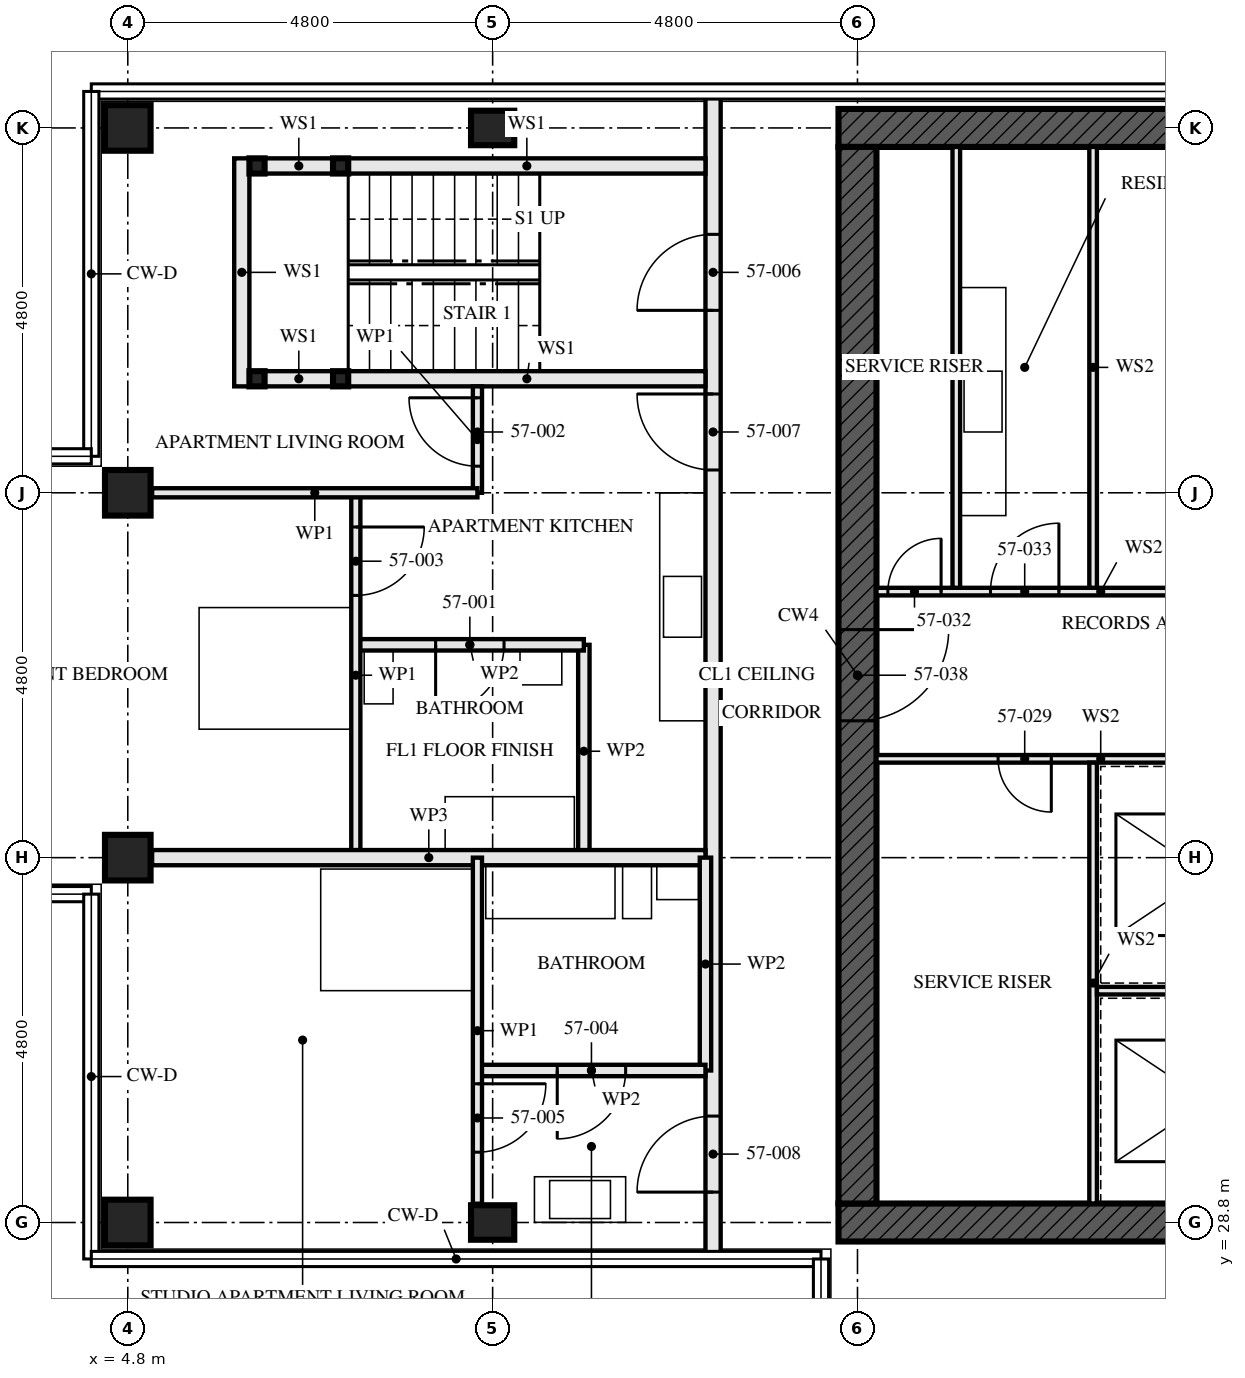
"""IFC4 building model, lengths in metres.
Left out: names, types, materials, properties, quantities, classifications, styles, units other than length and angle.
Written with IfcOpenShell. Run it as: python <this file> out.ifc"""

import sys

from ifc_helpers import new_model, si_unit, direction, frame, frame_2d, origin, origin_2d, place, context, subcontext, project, spatial, rectangle, hollow_rectangle, i_section, extrude, element, fill, save


model = new_model("IFC4")
c1 = context("Model", 3, precision=1e-05, world=origin(), true_north=direction((0.0, 1.0)))
c2 = subcontext(c1, "Body", "Model", "MODEL_VIEW")
j1 = project(units=[si_unit("LENGTHUNIT", "METRE"), si_unit("PLANEANGLEUNIT", "RADIAN")], contexts=[c1])
p1 = place(None, origin())
s1 = spatial("IfcSite", under=j1, at=p1, CompositionType="ELEMENT")
p2 = place(p1, origin())
s2 = spatial("IfcBuilding", under=s1, at=p2, CompositionType="ELEMENT")
p3 = place(p2, frame((0.0, 0.0, 208.5)))
s3 = spatial("IfcBuildingStorey", under=s2, at=p3, CompositionType="ELEMENT", Elevation=208.5)
for number, where, z_axis, x_axis in (
    (1, (4.8, 28.8, 0.0), (0.0, 0.0, 1.0), (0.0, 1.0, 0.0)),
    (2, (4.8, 33.6, 0.0), (0.0, 0.0, 1.0), (0.0, 1.0, 0.0)),
    (3, (4.8, 38.4, 0.0), (0.0, 0.0, 1.0), (0.0, 1.0, 0.0)),
    (4, (4.8, 43.2, 0.0), (0.0, 0.0, 1.0), (0.0, 1.0, 0.0)),
):
    element("IfcColumn", number, at=place(p3, frame(where, z_axis=z_axis, x_axis=x_axis)), inside=s3, PredefinedType="COLUMN", context=c2, shape_type="SweptSolid", body=[
        extrude(hollow_rectangle(XDim=0.6, YDim=0.6, WallThickness=0.05, at=origin_2d()), origin(), (0.0, 0.0, 1.0), 3.5),
    ])
for number, where, z_axis, x_axis in (
    (5, (9.6, 28.8, 0.0), (0.0, 0.0, 1.0), (0.0, 1.0, 0.0)),
    (6, (9.6, 43.2, 0.0), (0.0, 0.0, 1.0), (0.0, 1.0, 0.0)),
):
    element("IfcColumn", number, at=place(p3, frame(where, z_axis=z_axis, x_axis=x_axis)), inside=s3, PredefinedType="COLUMN", context=c2, shape_type="SweptSolid", body=[
        extrude(i_section(OverallWidth=0.454, OverallDepth=0.569, WebThickness=0.078, FlangeThickness=0.125, FilletRadius=0.015, at=origin_2d()), origin(), (0.0, 0.0, 1.0), 3.5),
    ])
p4 = place(p3, frame((14.15, 28.8, -0.17), z_axis=(0.0, 0.0, 1.0), x_axis=(1.0, 0.0, 0.0)))
e7 = element("IfcWall", 7, at=p4, inside=s3, PredefinedType="SHEAR", context=c2, shape_type="SweptSolid", body=[
    extrude(rectangle(XDim=14.9, YDim=0.5, at=frame_2d((7.45, 0.0))), origin(), (0.0, 0.0, 1.0), 3.5),
])
p5 = place(p4, frame((6.85, 0.0, 0.17)))
e8 = element("IfcOpeningElement", 8, at=p5, cuts=e7, PredefinedType="OPENING", context=c2, shape_type="SweptSolid", body=[
    extrude(rectangle(XDim=1.2, YDim=2.1, at=frame_2d((0.6, 1.05))), frame((0.0, 0.26, 0.0), z_axis=(0.0, -1.0, 0.0), x_axis=(1.0, 0.0, 0.0)), (0.0, 0.0, 1.0), 0.521),
])
p6 = place(p3, frame((29.05, 43.2, -0.17), z_axis=(0.0, 0.0, 1.0), x_axis=(-1.0, 0.0, 0.0)))
e9 = element("IfcWall", 9, at=p6, inside=s3, PredefinedType="SHEAR", context=c2, shape_type="SweptSolid", body=[
    extrude(rectangle(XDim=14.9, YDim=0.5, at=frame_2d((7.45, 0.0))), origin(), (0.0, 0.0, 1.0), 3.5),
])
p7 = place(p3, frame((14.4, 42.95, -0.17), z_axis=(0.0, 0.0, 1.0), x_axis=(0.0, -1.0, 0.0)))
e10 = element("IfcWall", 10, at=p7, inside=s3, PredefinedType="SHEAR", context=c2, shape_type="SweptSolid", body=[
    extrude(rectangle(XDim=13.9, YDim=0.5, at=frame_2d((6.95, 0.0))), origin(), (0.0, 0.0, 1.0), 3.5),
])
p8 = place(p7, frame((6.35, 0.0, 0.17)))
e11 = element("IfcOpeningElement", 11, at=p8, cuts=e10, PredefinedType="OPENING", context=c2, shape_type="SweptSolid", body=[
    extrude(rectangle(XDim=1.2, YDim=2.1, at=frame_2d((0.6, 1.05))), frame((0.0, 0.26, 0.0), z_axis=(0.0, -1.0, 0.0), x_axis=(1.0, 0.0, 0.0)), (0.0, 0.0, 1.0), 0.521),
])
for number, where, z_axis, x_axis in (
    (12, (6.5, 42.7, 0.0), (0.0, 0.0, 1.0), (1.0, 0.0, 0.0)),
    (13, (6.5, 39.9, 0.0), (0.0, 0.0, 1.0), (1.0, 0.0, 0.0)),
    (14, (7.6, 42.7, 0.0), (0.0, 0.0, 1.0), (1.0, 0.0, 0.0)),
    (15, (7.6, 39.9, 0.0), (0.0, 0.0, 1.0), (1.0, 0.0, 0.0)),
):
    element("IfcColumn", number, at=place(p3, frame(where, z_axis=z_axis, x_axis=x_axis)), inside=s3, PredefinedType="COLUMN", context=c2, shape_type="SweptSolid", body=[
        extrude(hollow_rectangle(XDim=0.2, YDim=0.2, WallThickness=0.008, at=origin_2d()), origin(), (0.0, 0.0, 1.0), 3.33),
    ])
p9 = place(p3, frame((6.6, 42.7, 0.0), z_axis=(0.0, 0.0, 1.0), x_axis=(1.0, 0.0, 0.0)))
e16 = element("IfcWall", 16, at=p9, inside=s3, PredefinedType="SOLIDWALL", context=c2, shape_type="SweptSolid", body=[
    extrude(rectangle(XDim=0.9, YDim=0.2, at=frame_2d((0.45, 0.0))), origin(), (0.0, 0.0, 1.0), 2.99),
])
p10 = place(p3, frame((7.7, 42.7, 0.0), z_axis=(0.0, 0.0, 1.0), x_axis=(1.0, 0.0, 0.0)))
e17 = element("IfcWall", 17, at=p10, inside=s3, PredefinedType="SOLIDWALL", context=c2, shape_type="SweptSolid", body=[
    extrude(rectangle(XDim=4.7, YDim=0.2, at=frame_2d((2.35, 0.0))), origin(), (0.0, 0.0, 1.0), 2.99),
])
p11 = place(p3, frame((6.6, 39.9, 0.0), z_axis=(0.0, 0.0, 1.0), x_axis=(1.0, 0.0, 0.0)))
e18 = element("IfcWall", 18, at=p11, inside=s3, PredefinedType="SOLIDWALL", context=c2, shape_type="SweptSolid", body=[
    extrude(rectangle(XDim=0.9, YDim=0.2, at=frame_2d((0.45, 0.0))), origin(), (0.0, 0.0, 1.0), 2.99),
])
p12 = place(p3, frame((7.7, 39.9, 0.0), z_axis=(0.0, 0.0, 1.0), x_axis=(1.0, 0.0, 0.0)))
e19 = element("IfcWall", 19, at=p12, inside=s3, PredefinedType="SOLIDWALL", context=c2, shape_type="SweptSolid", body=[
    extrude(rectangle(XDim=4.7, YDim=0.2, at=frame_2d((2.35, 0.0))), origin(), (0.0, 0.0, 1.0), 2.99),
])
p13 = place(p3, frame((6.3, 42.8, 0.0), z_axis=(0.0, 0.0, 1.0), x_axis=(0.0, -1.0, 0.0)))
e20 = element("IfcWall", 20, at=p13, inside=s3, PredefinedType="SOLIDWALL", context=c2, shape_type="SweptSolid", body=[
    extrude(rectangle(XDim=3.0, YDim=0.2, at=frame_2d((1.5, 0.0))), origin(), (0.0, 0.0, 1.0), 3.33),
])
p14 = place(p3, frame((7.8, 36.4, 0.0), z_axis=(0.0, 0.0, 1.0), x_axis=(1.0, 0.0, 0.0)))
e21 = element("IfcWall", 21, at=p14, inside=s3, PredefinedType="PARTITIONING", context=c2, shape_type="SweptSolid", body=[
    extrude(rectangle(XDim=3.0, YDim=0.15, at=frame_2d((1.5, 0.0))), origin(), (0.0, 0.0, 1.0), 3.33),
])
p15 = place(p14, frame((1.05, 0.0, 0.0)))
e22 = element("IfcOpeningElement", 22, at=p15, cuts=e21, PredefinedType="OPENING", context=c2, shape_type="SweptSolid", body=[
    extrude(rectangle(XDim=0.9, YDim=2.1, at=frame_2d((0.45, 1.05))), frame((0.0, 0.085, 0.0), z_axis=(0.0, -1.0, 0.0), x_axis=(1.0, 0.0, 0.0)), (0.0, 0.0, 1.0), 0.171),
])
p16 = place(p3, frame((10.8, 36.4, 0.0), z_axis=(0.0, 0.0, 1.0), x_axis=(0.0, -1.0, 0.0)))
e23 = element("IfcWall", 23, at=p16, inside=s3, PredefinedType="PARTITIONING", context=c2, shape_type="SweptSolid", body=[
    extrude(rectangle(XDim=2.8, YDim=0.15, at=frame_2d((1.4, 0.0))), origin(), (0.0, 0.0, 1.0), 3.33),
])
p17 = place(p3, frame((9.4, 39.8, 0.0), z_axis=(0.0, 0.0, 1.0), x_axis=(0.0, -1.0, 0.0)))
e24 = element("IfcWall", 24, at=p17, inside=s3, PredefinedType="PARTITIONING", context=c2, shape_type="SweptSolid", body=[
    extrude(rectangle(XDim=1.4, YDim=0.12, at=frame_2d((0.7, 0.0))), origin(), (0.0, 0.0, 1.0), 3.33),
])
p18 = place(p17, frame((0.15, 0.0, 0.0)))
e25 = element("IfcOpeningElement", 25, at=p18, cuts=e24, PredefinedType="OPENING", context=c2, shape_type="SweptSolid", body=[
    extrude(rectangle(XDim=0.9, YDim=2.1, at=frame_2d((0.45, 1.05))), frame((0.0, 0.071, 0.0), z_axis=(0.0, -1.0, 0.0), x_axis=(1.0, 0.0, 0.0)), (0.0, 0.0, 1.0), 0.141),
])
p19 = place(p3, frame((7.8, 38.4, 0.0), z_axis=(0.0, 0.0, 1.0), x_axis=(0.0, -1.0, 0.0)))
e26 = element("IfcWall", 26, at=p19, inside=s3, PredefinedType="PARTITIONING", context=c2, shape_type="SweptSolid", body=[
    extrude(rectangle(XDim=4.8, YDim=0.12, at=frame_2d((2.4, 0.0))), origin(), (0.0, 0.0, 1.0), 3.33),
])
p20 = place(p19, frame((0.45, 0.0, 0.0)))
e27 = element("IfcOpeningElement", 27, at=p20, cuts=e26, PredefinedType="OPENING", context=c2, shape_type="SweptSolid", body=[
    extrude(rectangle(XDim=0.9, YDim=2.1, at=frame_2d((0.45, 1.05))), frame((0.0, 0.071, 0.0), z_axis=(0.0, -1.0, 0.0), x_axis=(1.0, 0.0, 0.0)), (0.0, 0.0, 1.0), 0.141),
])
p21 = place(p3, frame((5.12, 38.4, 0.0), z_axis=(0.0, 0.0, 1.0), x_axis=(1.0, 0.0, 0.0)))
e28 = element("IfcWall", 28, at=p21, inside=s3, PredefinedType="PARTITIONING", context=c2, shape_type="SweptSolid", body=[
    extrude(rectangle(XDim=4.28, YDim=0.12, at=frame_2d((2.14, 0.0))), origin(), (0.0, 0.0, 1.0), 2.55),
])
p22 = place(p3, frame((5.12, 33.6, 0.0), z_axis=(0.0, 0.0, 1.0), x_axis=(1.0, 0.0, 0.0)))
e29 = element("IfcWall", 29, at=p22, inside=s3, PredefinedType="PARTITIONING", context=c2, shape_type="SweptSolid", body=[
    extrude(rectangle(XDim=7.28, YDim=0.2, at=frame_2d((3.64, 0.0))), origin(), (0.0, 0.0, 1.0), 2.55),
])
p23 = place(p3, frame((9.4, 30.8, 0.0), z_axis=(0.0, 0.0, 1.0), x_axis=(1.0, 0.0, 0.0)))
e30 = element("IfcWall", 30, at=p23, inside=s3, PredefinedType="PARTITIONING", context=c2, shape_type="SweptSolid", body=[
    extrude(rectangle(XDim=3.0, YDim=0.15, at=frame_2d((1.5, 0.0))), origin(), (0.0, 0.0, 1.0), 3.33),
])
p24 = place(p23, frame((1.05, 0.0, 0.0)))
e31 = element("IfcOpeningElement", 31, at=p24, cuts=e30, PredefinedType="OPENING", context=c2, shape_type="SweptSolid", body=[
    extrude(rectangle(XDim=0.9, YDim=2.1, at=frame_2d((0.45, 1.05))), frame((0.0, 0.085, 0.0), z_axis=(0.0, -1.0, 0.0), x_axis=(1.0, 0.0, 0.0)), (0.0, 0.0, 1.0), 0.171),
])
p25 = place(p3, frame((12.4, 33.6, 0.0), z_axis=(0.0, 0.0, 1.0), x_axis=(0.0, -1.0, 0.0)))
e32 = element("IfcWall", 32, at=p25, inside=s3, PredefinedType="PARTITIONING", context=c2, shape_type="SweptSolid", body=[
    extrude(rectangle(XDim=2.8, YDim=0.15, at=frame_2d((1.4, 0.0))), origin(), (0.0, 0.0, 1.0), 3.33),
])
p26 = place(p3, frame((9.4, 33.6, 0.0), z_axis=(0.0, 0.0, 1.0), x_axis=(0.0, -1.0, 0.0)))
e33 = element("IfcWall", 33, at=p26, inside=s3, PredefinedType="PARTITIONING", context=c2, shape_type="SweptSolid", body=[
    extrude(rectangle(XDim=4.553, YDim=0.12, at=frame_2d((2.276, 0.0))), origin(), (0.0, 0.0, 1.0), 3.33),
])
p27 = place(p26, frame((2.975, 0.0, 0.0)))
e34 = element("IfcOpeningElement", 34, at=p27, cuts=e33, PredefinedType="OPENING", context=c2, shape_type="SweptSolid", body=[
    extrude(rectangle(XDim=0.9, YDim=2.1, at=frame_2d((0.45, 1.05))), frame((0.0, 0.071, 0.0), z_axis=(0.0, -1.0, 0.0), x_axis=(1.0, 0.0, 0.0)), (0.0, 0.0, 1.0), 0.141),
])
p28 = place(p3, frame((12.5, 43.655, 0.0), z_axis=(0.0, 0.0, 1.0), x_axis=(0.0, -1.0, 0.0)))
e35 = element("IfcWall", 35, at=p28, inside=s3, PredefinedType="PARTITIONING", context=c2, shape_type="SweptSolid", body=[
    extrude(rectangle(XDim=15.31, YDim=0.2, at=frame_2d((7.655, 0.0))), origin(), (0.0, 0.0, 1.0), 2.32),
])
p29 = place(p28, frame((1.855, 0.0, 0.0)))
e36 = element("IfcOpeningElement", 36, at=p29, cuts=e35, PredefinedType="OPENING", context=c2, shape_type="SweptSolid", body=[
    extrude(rectangle(XDim=1.0, YDim=2.1, at=frame_2d((0.5, 1.05))), frame((0.0, 0.111, 0.0), z_axis=(0.0, -1.0, 0.0), x_axis=(1.0, 0.0, 0.0)), (0.0, 0.0, 1.0), 0.221),
])
p30 = place(p28, frame((3.955, 0.0, 0.0)))
e37 = element("IfcOpeningElement", 37, at=p30, cuts=e35, PredefinedType="OPENING", context=c2, shape_type="SweptSolid", body=[
    extrude(rectangle(XDim=1.0, YDim=2.1, at=frame_2d((0.5, 1.05))), frame((0.0, 0.111, 0.0), z_axis=(0.0, -1.0, 0.0), x_axis=(1.0, 0.0, 0.0)), (0.0, 0.0, 1.0), 0.221),
])
p31 = place(p28, frame((13.455, 0.0, 0.0)))
e38 = element("IfcOpeningElement", 38, at=p31, cuts=e35, PredefinedType="OPENING", context=c2, shape_type="SweptSolid", body=[
    extrude(rectangle(XDim=1.0, YDim=2.1, at=frame_2d((0.5, 1.05))), frame((0.0, 0.111, 0.0), z_axis=(0.0, -1.0, 0.0), x_axis=(1.0, 0.0, 0.0)), (0.0, 0.0, 1.0), 0.221),
])
p32 = place(p3, frame((15.7, 37.15, 0.0), z_axis=(0.0, 0.0, 1.0), x_axis=(0.0, 1.0, 0.0)))
e39 = element("IfcWall", 39, at=p32, inside=s3, PredefinedType="SOLIDWALL", context=c2, shape_type="SweptSolid", body=[
    extrude(rectangle(XDim=5.8, YDim=0.1, at=frame_2d((2.9, 0.0))), origin(), (0.0, 0.0, 1.0), 3.33),
])
p33 = place(p3, frame((14.65, 34.9, 0.0), z_axis=(0.0, 0.0, 1.0), x_axis=(1.0, 0.0, 0.0)))
e40 = element("IfcWall", 40, at=p33, inside=s3, PredefinedType="SOLIDWALL", context=c2, shape_type="SweptSolid", body=[
    extrude(rectangle(XDim=5.9, YDim=0.1, at=frame_2d((2.95, 0.0))), origin(), (0.0, 0.0, 1.0), 3.33),
])
p34 = place(p33, frame((1.6, 0.0, 0.0)))
e41 = element("IfcOpeningElement", 41, at=p34, cuts=e40, PredefinedType="OPENING", context=c2, shape_type="SweptSolid", body=[
    extrude(rectangle(XDim=0.7, YDim=2.1, at=frame_2d((0.35, 1.05))), frame((0.0, 0.061, 0.0), z_axis=(0.0, -1.0, 0.0), x_axis=(1.0, 0.0, 0.0)), (0.0, 0.0, 1.0), 0.121),
])
p35 = place(p3, frame((14.65, 37.1, 0.0), z_axis=(0.0, 0.0, 1.0), x_axis=(1.0, 0.0, 0.0)))
e42 = element("IfcWall", 42, at=p35, inside=s3, PredefinedType="SOLIDWALL", context=c2, shape_type="SweptSolid", body=[
    extrude(rectangle(XDim=5.9, YDim=0.1, at=frame_2d((2.95, 0.0))), origin(), (0.0, 0.0, 1.0), 3.33),
])
p36 = place(p35, frame((0.15, 0.0, 0.0)))
e43 = element("IfcOpeningElement", 43, at=p36, cuts=e42, PredefinedType="OPENING", context=c2, shape_type="SweptSolid", body=[
    extrude(rectangle(XDim=0.7, YDim=2.1, at=frame_2d((0.35, 1.05))), frame((0.0, 0.061, 0.0), z_axis=(0.0, -1.0, 0.0), x_axis=(1.0, 0.0, 0.0)), (0.0, 0.0, 1.0), 0.121),
])
p37 = place(p35, frame((1.5, 0.0, 0.0)))
e44 = element("IfcOpeningElement", 44, at=p37, cuts=e42, PredefinedType="OPENING", context=c2, shape_type="SweptSolid", body=[
    extrude(rectangle(XDim=0.9, YDim=2.1, at=frame_2d((0.45, 1.05))), frame((0.0, 0.061, 0.0), z_axis=(0.0, -1.0, 0.0), x_axis=(1.0, 0.0, 0.0)), (0.0, 0.0, 1.0), 0.121),
])
p38 = place(p3, frame((17.5, 29.05, 0.0), z_axis=(0.0, 0.0, 1.0), x_axis=(0.0, 1.0, 0.0)))
e45 = element("IfcWall", 45, at=p38, inside=s3, PredefinedType="SOLIDWALL", context=c2, shape_type="SweptSolid", body=[
    extrude(rectangle(XDim=5.8, YDim=0.1, at=frame_2d((2.9, 0.0))), origin(), (0.0, 0.0, 1.0), 3.33),
])
p39 = place(p3, frame((17.55, 31.85, 0.0), z_axis=(0.0, 0.0, 1.0), x_axis=(1.0, 0.0, 0.0)))
e46 = element("IfcWall", 46, at=p39, inside=s3, PredefinedType="SOLIDWALL", context=c2, shape_type="SweptSolid", body=[
    extrude(rectangle(XDim=2.9, YDim=0.1, at=frame_2d((1.45, 0.0))), origin(), (0.0, 0.0, 1.0), 3.33),
])
p40 = place(p3, frame((17.5, 37.15, 0.0), z_axis=(0.0, 0.0, 1.0), x_axis=(0.0, 1.0, 0.0)))
e47 = element("IfcWall", 47, at=p40, inside=s3, PredefinedType="SOLIDWALL", context=c2, shape_type="SweptSolid", body=[
    extrude(rectangle(XDim=5.8, YDim=0.1, at=frame_2d((2.9, 0.0))), origin(), (0.0, 0.0, 1.0), 3.33),
])
p41 = place(p15, frame((0.9, 0.0, 0.0), z_axis=(0.0, 0.0, 1.0), x_axis=(-1.0, 0.0, 0.0)))
e48 = element("IfcDoor", 48, at=p41, inside=s3, OperationType="SINGLE_SWING_LEFT", PredefinedType="DOOR", context=c2, shape_type="SweptSolid", body=[
    extrude(rectangle(XDim=0.9, YDim=2.1, at=frame_2d((0.45, 1.05))), frame((0.0, 0.022, 0.0), z_axis=(0.0, -1.0, 0.0), x_axis=(1.0, 0.0, 0.0)), (0.0, 0.0, 1.0), 0.044),
])
fill(e22, e48)
p42 = place(p18, frame((0.9, 0.0, 0.0), z_axis=(0.0, 0.0, 1.0), x_axis=(-1.0, 0.0, 0.0)))
e49 = element("IfcDoor", 49, at=p42, inside=s3, OperationType="SINGLE_SWING_LEFT", PredefinedType="DOOR", context=c2, shape_type="SweptSolid", body=[
    extrude(rectangle(XDim=0.9, YDim=2.1, at=frame_2d((0.45, 1.05))), frame((0.0, 0.022, 0.0), z_axis=(0.0, -1.0, 0.0), x_axis=(1.0, 0.0, 0.0)), (0.0, 0.0, 1.0), 0.044),
])
fill(e25, e49)
p43 = place(p20, origin())
e50 = element("IfcDoor", 50, at=p43, inside=s3, OperationType="SINGLE_SWING_RIGHT", PredefinedType="DOOR", context=c2, shape_type="SweptSolid", body=[
    extrude(rectangle(XDim=0.9, YDim=2.1, at=frame_2d((0.45, 1.05))), frame((0.0, 0.022, 0.0), z_axis=(0.0, -1.0, 0.0), x_axis=(1.0, 0.0, 0.0)), (0.0, 0.0, 1.0), 0.044),
])
fill(e27, e50)
p44 = place(p24, frame((0.9, 0.0, 0.0), z_axis=(0.0, 0.0, 1.0), x_axis=(-1.0, 0.0, 0.0)))
e51 = element("IfcDoor", 51, at=p44, inside=s3, OperationType="SINGLE_SWING_LEFT", PredefinedType="DOOR", context=c2, shape_type="SweptSolid", body=[
    extrude(rectangle(XDim=0.9, YDim=2.1, at=frame_2d((0.45, 1.05))), frame((0.0, 0.022, 0.0), z_axis=(0.0, -1.0, 0.0), x_axis=(1.0, 0.0, 0.0)), (0.0, 0.0, 1.0), 0.044),
])
fill(e31, e51)
p45 = place(p27, origin())
e52 = element("IfcDoor", 52, at=p45, inside=s3, OperationType="SINGLE_SWING_RIGHT", PredefinedType="DOOR", context=c2, shape_type="SweptSolid", body=[
    extrude(rectangle(XDim=0.9, YDim=2.1, at=frame_2d((0.45, 1.05))), frame((0.0, 0.022, 0.0), z_axis=(0.0, -1.0, 0.0), x_axis=(1.0, 0.0, 0.0)), (0.0, 0.0, 1.0), 0.044),
])
fill(e34, e52)
p46 = place(p29, frame((1.0, 0.0, 0.0), z_axis=(0.0, 0.0, 1.0), x_axis=(-1.0, 0.0, 0.0)))
e53 = element("IfcDoor", 53, at=p46, inside=s3, OperationType="SINGLE_SWING_RIGHT", PredefinedType="DOOR", context=c2, shape_type="SweptSolid", body=[
    extrude(rectangle(XDim=1.0, YDim=2.1, at=frame_2d((0.5, 1.05))), frame((0.0, 0.032, 0.0), z_axis=(0.0, -1.0, 0.0), x_axis=(1.0, 0.0, 0.0)), (0.0, 0.0, 1.0), 0.064),
])
fill(e36, e53)
p47 = place(p30, frame((1.0, 0.0, 0.0), z_axis=(0.0, 0.0, 1.0), x_axis=(-1.0, 0.0, 0.0)))
e54 = element("IfcDoor", 54, at=p47, inside=s3, OperationType="SINGLE_SWING_LEFT", PredefinedType="DOOR", context=c2, shape_type="SweptSolid", body=[
    extrude(rectangle(XDim=1.0, YDim=2.1, at=frame_2d((0.5, 1.05))), frame((0.0, 0.027, 0.0), z_axis=(0.0, -1.0, 0.0), x_axis=(1.0, 0.0, 0.0)), (0.0, 0.0, 1.0), 0.054),
])
fill(e37, e54)
p48 = place(p31, frame((1.0, 0.0, 0.0), z_axis=(0.0, 0.0, 1.0), x_axis=(-1.0, 0.0, 0.0)))
e55 = element("IfcDoor", 55, at=p48, inside=s3, OperationType="SINGLE_SWING_RIGHT", PredefinedType="DOOR", context=c2, shape_type="SweptSolid", body=[
    extrude(rectangle(XDim=1.0, YDim=2.1, at=frame_2d((0.5, 1.05))), frame((0.0, 0.027, 0.0), z_axis=(0.0, -1.0, 0.0), x_axis=(1.0, 0.0, 0.0)), (0.0, 0.0, 1.0), 0.054),
])
fill(e38, e55)
p49 = place(p34, frame((0.7, 0.0, 0.0), z_axis=(0.0, 0.0, 1.0), x_axis=(-1.0, 0.0, 0.0)))
e56 = element("IfcDoor", 56, at=p49, inside=s3, OperationType="SINGLE_SWING_RIGHT", PredefinedType="DOOR", context=c2, shape_type="SweptSolid", body=[
    extrude(rectangle(XDim=0.7, YDim=2.1, at=frame_2d((0.35, 1.05))), frame((0.0, 0.027, 0.0), z_axis=(0.0, -1.0, 0.0), x_axis=(1.0, 0.0, 0.0)), (0.0, 0.0, 1.0), 0.054),
])
fill(e41, e56)
p50 = place(p36, origin())
e57 = element("IfcDoor", 57, at=p50, inside=s3, OperationType="SINGLE_SWING_LEFT", PredefinedType="DOOR", context=c2, shape_type="SweptSolid", body=[
    extrude(rectangle(XDim=0.7, YDim=2.1, at=frame_2d((0.35, 1.05))), frame((0.0, 0.027, 0.0), z_axis=(0.0, -1.0, 0.0), x_axis=(1.0, 0.0, 0.0)), (0.0, 0.0, 1.0), 0.054),
])
fill(e43, e57)
p51 = place(p37, origin())
e58 = element("IfcDoor", 58, at=p51, inside=s3, OperationType="SINGLE_SWING_LEFT", PredefinedType="DOOR", context=c2, shape_type="SweptSolid", body=[
    extrude(rectangle(XDim=0.9, YDim=2.1, at=frame_2d((0.45, 1.05))), frame((0.0, 0.027, 0.0), z_axis=(0.0, -1.0, 0.0), x_axis=(1.0, 0.0, 0.0)), (0.0, 0.0, 1.0), 0.054),
])
fill(e44, e58)
p52 = place(p8, origin())
e59 = element("IfcDoor", 59, at=p52, inside=s3, OperationType="SINGLE_SWING_LEFT", PredefinedType="DOOR", context=c2, shape_type="SweptSolid", body=[
    extrude(rectangle(XDim=1.2, YDim=2.1, at=frame_2d((0.6, 1.05))), frame((0.0, 0.027, 0.0), z_axis=(0.0, -1.0, 0.0), x_axis=(1.0, 0.0, 0.0)), (0.0, 0.0, 1.0), 0.054),
])
fill(e11, e59)
save(model, sys.argv[1])
